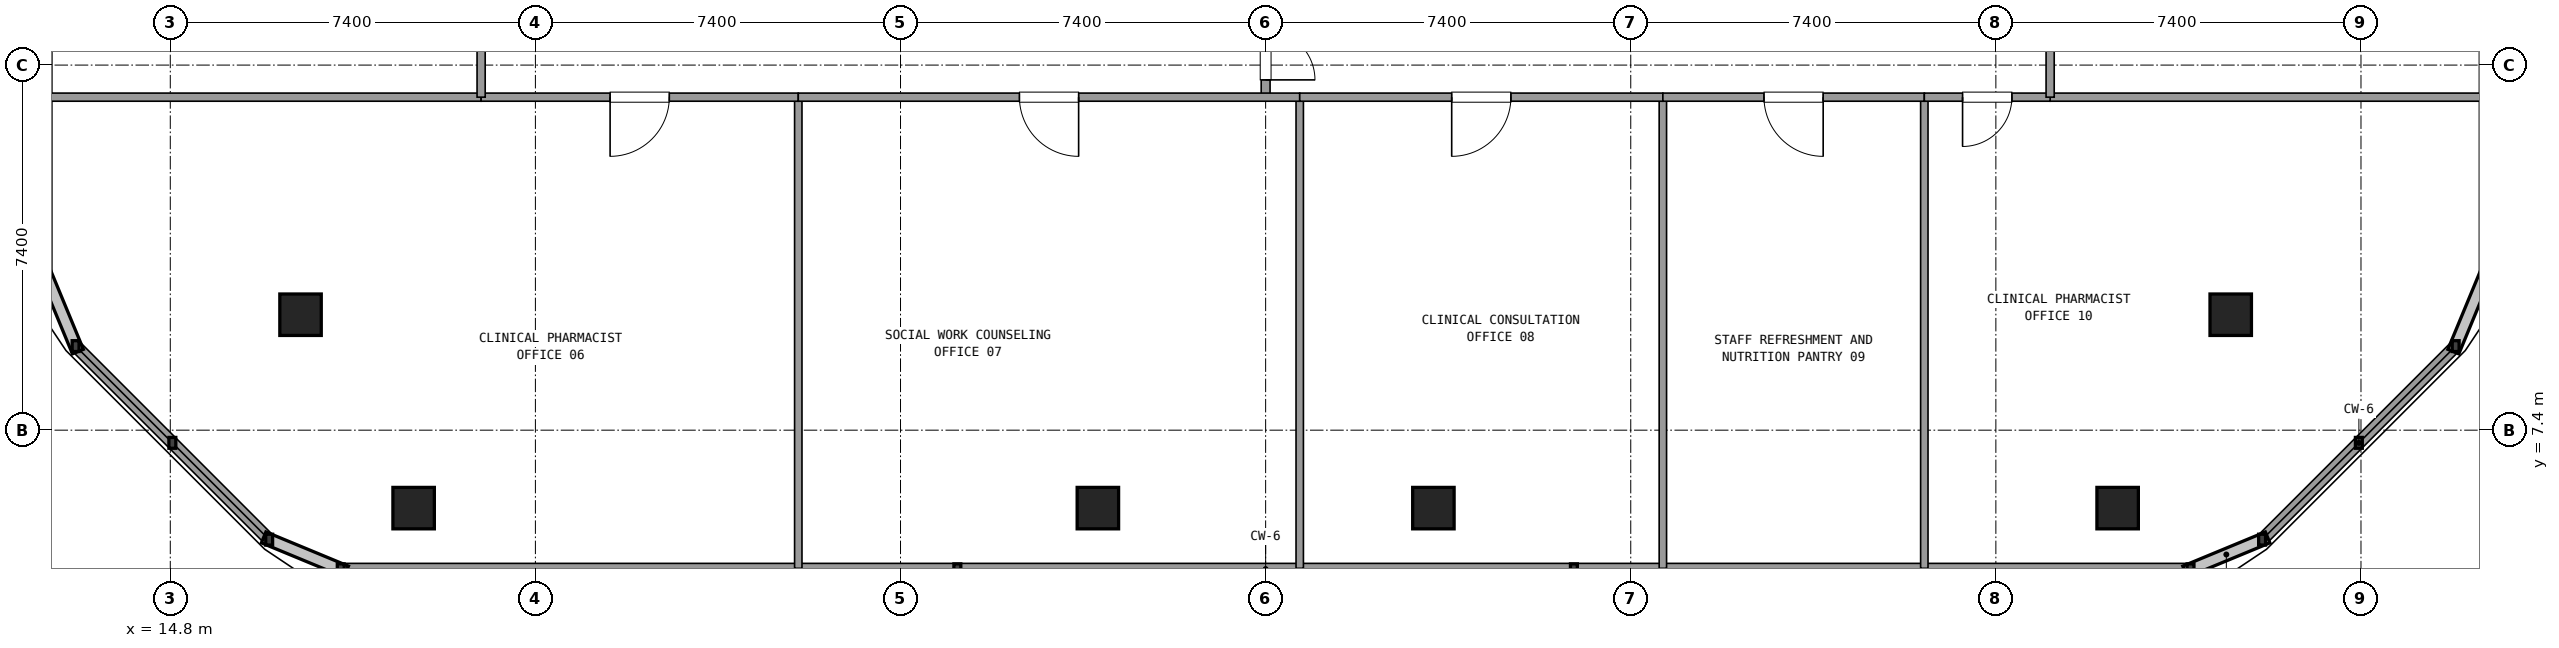
"""IFC4 building model, lengths in metres.
Left out: names, types, materials, properties, quantities, classifications, styles, units other than length and angle.
Written with IfcOpenShell. Run it as: python <this file> out.ifc"""

import sys

from ifc_helpers import new_model, si_unit, direction, frame, frame_2d, origin, origin_2d, place, context, subcontext, project, spatial, rectangle, extrude, element, fill, save


model = new_model("IFC4")
c1 = context("Model", 3, precision=1e-05, world=origin(), true_north=direction((0.0, 1.0)))
c2 = subcontext(c1, "Body", "Model", "MODEL_VIEW")
j1 = project(units=[si_unit("LENGTHUNIT", "METRE"), si_unit("PLANEANGLEUNIT", "RADIAN")], contexts=[c1])
p1 = place(None, origin())
s1 = spatial("IfcSite", under=j1, at=p1, CompositionType="ELEMENT")
p2 = place(p1, origin())
s2 = spatial("IfcBuilding", under=s1, at=p2, CompositionType="ELEMENT")
p3 = place(p2, frame((0.0, 0.0, 242.82)))
s3 = spatial("IfcBuildingStorey", under=s2, at=p3, CompositionType="ELEMENT", Elevation=242.82)
for number, where, z_axis, x_axis in (
    (1, (17.44, 9.74, 0.0), (0.0, 0.0, 1.0), (1.0, 0.0, 0.0)),
    (2, (19.732, 5.82, 0.0), (0.0, 0.0, 1.0), (1.0, 0.0, 0.0)),
    (3, (33.6, 5.82, 0.0), (0.0, 0.0, 1.0), (1.0, 0.0, 0.0)),
    (4, (40.4, 5.82, 0.0), (0.0, 0.0, 1.0), (1.0, 0.0, 0.0)),
    (5, (54.268, 5.82, 0.0), (0.0, 0.0, 1.0), (1.0, 0.0, 0.0)),
    (6, (56.56, 9.74, 0.0), (0.0, 0.0, 1.0), (1.0, 0.0, 0.0)),
):
    element("IfcColumn", number, at=place(p3, frame(where, z_axis=z_axis, x_axis=x_axis)), inside=s3, PredefinedType="COLUMN", context=c2, shape_type="SweptSolid", body=[
        extrude(rectangle(XDim=0.84, YDim=0.84, at=origin_2d()), origin(), (0.0, 0.0, 1.0), 3.6),
    ])
p4 = place(p3, frame((18.255, 4.58, 0.0), z_axis=(0.0, 0.0, 1.0), x_axis=(1.0, 0.0, 0.0)))
e7 = element("IfcWall", 7, at=p4, inside=s3, PredefinedType="SOLIDWALL", context=c2, shape_type="SweptSolid", body=[
    extrude(rectangle(XDim=37.49, YDim=0.24, at=frame_2d((18.745, 0.0))), origin(), (0.0, 0.0, 1.0), 0.85),
])
p5 = place(p3, frame((57.196, 5.181, 0.0), z_axis=(0.0, 0.0, 1.0), x_axis=(0.707084777957, 0.707128783731, 0.0)))
e8 = element("IfcWall", 8, at=p5, inside=s3, PredefinedType="SOLIDWALL", context=c2, shape_type="SweptSolid", body=[
    extrude(rectangle(XDim=5.548, YDim=0.24, at=frame_2d((2.774, 0.0))), origin(), (0.0, 0.0, 1.0), 0.85),
])
for number, where, z_axis, x_axis in (
    (9, (61.72, 10.555, 0.0), (0.0, 0.0, 1.0), (0.0, 1.0, 0.0)),
    (10, (12.28, 24.36, 0.0), (0.0, 0.0, 1.0), (0.0, -1.0, 0.0)),
):
    element("IfcWall", number, at=place(p3, frame(where, z_axis=z_axis, x_axis=x_axis)), inside=s3, PredefinedType="SOLIDWALL", context=c2, shape_type="SweptSolid", body=[
        extrude(rectangle(XDim=13.805, YDim=0.24, at=frame_2d((6.903, 0.0))), origin(), (0.0, 0.0, 1.0), 0.85),
    ])
p6 = place(p3, frame((12.881, 9.104, 0.0), z_axis=(0.0, 0.0, 1.0), x_axis=(0.707084777957, -0.707128783731, 0.0)))
e11 = element("IfcWall", 11, at=p6, inside=s3, PredefinedType="SOLIDWALL", context=c2, shape_type="SweptSolid", body=[
    extrude(rectangle(XDim=5.548, YDim=0.24, at=frame_2d((2.774, 0.0))), origin(), (0.0, 0.0, 1.0), 0.85),
])
p7 = place(p3, frame((37.0, 14.15, 0.0), z_axis=(0.0, 0.0, 1.0), x_axis=(0.0, 1.0, 0.0)))
e12 = element("IfcWall", 12, at=p7, inside=s3, PredefinedType="PARTITIONING", context=c2, shape_type="SweptSolid", body=[
    extrude(rectangle(XDim=2.7, YDim=0.18, at=frame_2d((1.35, 0.0))), origin(), (0.0, 0.0, 1.0), 2.61),
])
p8 = place(p7, frame((0.35, 0.0, 0.0)))
e13 = element("IfcOpeningElement", 13, at=p8, cuts=e12, PredefinedType="OPENING", context=c2, shape_type="SweptSolid", body=[
    extrude(rectangle(XDim=2.0, YDim=2.2, at=frame_2d((1.0, 1.1))), frame((0.0, 0.1, 0.0), z_axis=(0.0, -1.0, 0.0), x_axis=(1.0, 0.0, 0.0)), (0.0, 0.0, 1.0), 0.2),
])
for number, where, z_axis, x_axis in (
    (14, (12.3, 14.15, 0.0), (0.0, 0.0, 1.0), (1.0, 0.0, 0.0)),
    (15, (52.9, 14.15, 0.0), (0.0, 0.0, 1.0), (1.0, 0.0, 0.0)),
):
    element("IfcWall", number, at=place(p3, frame(where, z_axis=z_axis, x_axis=x_axis)), inside=s3, PredefinedType="PARTITIONING", context=c2, shape_type="SweptSolid", body=[
        extrude(rectangle(XDim=8.8, YDim=0.165, at=frame_2d((4.4, 0.0))), origin(), (0.0, 0.0, 1.0), 2.61),
    ])
p9 = place(p3, frame((27.528, 14.15, 0.0), z_axis=(0.0, 0.0, 1.0), x_axis=(0.0, -1.0, 0.0)))
e16 = element("IfcWall", 16, at=p9, inside=s3, PredefinedType="PARTITIONING", context=c2, shape_type="SweptSolid", body=[
    extrude(rectangle(XDim=9.55, YDim=0.15, at=frame_2d((4.775, 0.0))), origin(), (0.0, 0.0, 1.0), 2.61),
])
p10 = place(p3, frame((21.1, 14.15, 0.0), z_axis=(0.0, 0.0, 1.0), x_axis=(1.0, 0.0, 0.0)))
e17 = element("IfcWall", 17, at=p10, inside=s3, PredefinedType="PARTITIONING", context=c2, shape_type="SweptSolid", body=[
    extrude(rectangle(XDim=6.428, YDim=0.165, at=frame_2d((3.214, 0.0))), origin(), (0.0, 0.0, 1.0), 2.61),
])
p11 = place(p10, frame((2.614, 0.0, 0.0)))
e18 = element("IfcOpeningElement", 18, at=p11, cuts=e17, PredefinedType="OPENING", context=c2, shape_type="SweptSolid", body=[
    extrude(rectangle(XDim=1.2, YDim=2.15, at=frame_2d((0.6, 1.075))), frame((0.0, 0.093, 0.0), z_axis=(0.0, -1.0, 0.0), x_axis=(1.0, 0.0, 0.0)), (0.0, 0.0, 1.0), 0.185),
])
p12 = place(p3, frame((37.691, 14.15, 0.0), z_axis=(0.0, 0.0, 1.0), x_axis=(0.0, -1.0, 0.0)))
e19 = element("IfcWall", 19, at=p12, inside=s3, PredefinedType="PARTITIONING", context=c2, shape_type="SweptSolid", body=[
    extrude(rectangle(XDim=9.55, YDim=0.15, at=frame_2d((4.775, 0.0))), origin(), (0.0, 0.0, 1.0), 2.61),
])
p13 = place(p3, frame((27.528, 14.15, 0.0), z_axis=(0.0, 0.0, 1.0), x_axis=(1.0, 0.0, 0.0)))
e20 = element("IfcWall", 20, at=p13, inside=s3, PredefinedType="PARTITIONING", context=c2, shape_type="SweptSolid", body=[
    extrude(rectangle(XDim=10.163, YDim=0.165, at=frame_2d((5.082, 0.0))), origin(), (0.0, 0.0, 1.0), 2.61),
])
p14 = place(p13, frame((4.482, 0.0, 0.0)))
e21 = element("IfcOpeningElement", 21, at=p14, cuts=e20, PredefinedType="OPENING", context=c2, shape_type="SweptSolid", body=[
    extrude(rectangle(XDim=1.2, YDim=2.15, at=frame_2d((0.6, 1.075))), frame((0.0, 0.093, 0.0), z_axis=(0.0, -1.0, 0.0), x_axis=(1.0, 0.0, 0.0)), (0.0, 0.0, 1.0), 0.185),
])
p15 = place(p3, frame((45.051, 14.15, 0.0), z_axis=(0.0, 0.0, 1.0), x_axis=(0.0, -1.0, 0.0)))
e22 = element("IfcWall", 22, at=p15, inside=s3, PredefinedType="PARTITIONING", context=c2, shape_type="SweptSolid", body=[
    extrude(rectangle(XDim=9.55, YDim=0.15, at=frame_2d((4.775, 0.0))), origin(), (0.0, 0.0, 1.0), 2.61),
])
p16 = place(p3, frame((37.691, 14.15, 0.0), z_axis=(0.0, 0.0, 1.0), x_axis=(1.0, 0.0, 0.0)))
e23 = element("IfcWall", 23, at=p16, inside=s3, PredefinedType="PARTITIONING", context=c2, shape_type="SweptSolid", body=[
    extrude(rectangle(XDim=7.36, YDim=0.165, at=frame_2d((3.68, 0.0))), origin(), (0.0, 0.0, 1.0), 2.61),
])
p17 = place(p16, frame((3.08, 0.0, 0.0)))
e24 = element("IfcOpeningElement", 24, at=p17, cuts=e23, PredefinedType="OPENING", context=c2, shape_type="SweptSolid", body=[
    extrude(rectangle(XDim=1.2, YDim=2.15, at=frame_2d((0.6, 1.075))), frame((0.0, 0.093, 0.0), z_axis=(0.0, -1.0, 0.0), x_axis=(1.0, 0.0, 0.0)), (0.0, 0.0, 1.0), 0.185),
])
p18 = place(p3, frame((50.35, 14.15, 0.0), z_axis=(0.0, 0.0, 1.0), x_axis=(0.0, -1.0, 0.0)))
e25 = element("IfcWall", 25, at=p18, inside=s3, PredefinedType="PARTITIONING", context=c2, shape_type="SweptSolid", body=[
    extrude(rectangle(XDim=9.55, YDim=0.15, at=frame_2d((4.775, 0.0))), origin(), (0.0, 0.0, 1.0), 2.61),
])
p19 = place(p3, frame((45.051, 14.15, 0.0), z_axis=(0.0, 0.0, 1.0), x_axis=(1.0, 0.0, 0.0)))
e26 = element("IfcWall", 26, at=p19, inside=s3, PredefinedType="PARTITIONING", context=c2, shape_type="SweptSolid", body=[
    extrude(rectangle(XDim=5.299, YDim=0.165, at=frame_2d((2.649, 0.0))), origin(), (0.0, 0.0, 1.0), 2.61),
])
p20 = place(p19, frame((2.049, 0.0, 0.0)))
e27 = element("IfcOpeningElement", 27, at=p20, cuts=e26, PredefinedType="OPENING", context=c2, shape_type="SweptSolid", body=[
    extrude(rectangle(XDim=1.2, YDim=2.15, at=frame_2d((0.6, 1.075))), frame((0.0, 0.093, 0.0), z_axis=(0.0, -1.0, 0.0), x_axis=(1.0, 0.0, 0.0)), (0.0, 0.0, 1.0), 0.185),
])
p21 = place(p3, frame((50.35, 14.15, 0.0), z_axis=(0.0, 0.0, 1.0), x_axis=(1.0, 0.0, 0.0)))
e28 = element("IfcWall", 28, at=p21, inside=s3, PredefinedType="PARTITIONING", context=c2, shape_type="SweptSolid", body=[
    extrude(rectangle(XDim=2.55, YDim=0.165, at=frame_2d((1.275, 0.0))), origin(), (0.0, 0.0, 1.0), 2.61),
])
p22 = place(p21, frame((0.775, 0.0, 0.0)))
e29 = element("IfcOpeningElement", 29, at=p22, cuts=e28, PredefinedType="OPENING", context=c2, shape_type="SweptSolid", body=[
    extrude(rectangle(XDim=1.0, YDim=2.15, at=frame_2d((0.5, 1.075))), frame((0.0, 0.093, 0.0), z_axis=(0.0, -1.0, 0.0), x_axis=(1.0, 0.0, 0.0)), (0.0, 0.0, 1.0), 0.185),
])
p23 = place(p3, frame((21.1, 14.15, 0.0), z_axis=(0.0, 0.0, 1.0), x_axis=(0.0, 1.0, 0.0)))
e30 = element("IfcWall", 30, at=p23, inside=s3, PredefinedType="PARTITIONING", context=c2, shape_type="SweptSolid", body=[
    extrude(rectangle(XDim=5.17, YDim=0.165, at=frame_2d((2.585, 0.0))), origin(), (0.0, 0.0, 1.0), 2.61),
])
p24 = place(p23, frame((1.985, 0.0, 0.0)))
e31 = element("IfcOpeningElement", 31, at=p24, cuts=e30, PredefinedType="OPENING", context=c2, shape_type="SweptSolid", body=[
    extrude(rectangle(XDim=1.2, YDim=2.15, at=frame_2d((0.6, 1.075))), frame((0.0, 0.093, 0.0), z_axis=(0.0, -1.0, 0.0), x_axis=(1.0, 0.0, 0.0)), (0.0, 0.0, 1.0), 0.185),
])
p25 = place(p3, frame((52.9, 14.15, 0.0), z_axis=(0.0, 0.0, 1.0), x_axis=(0.0, 1.0, 0.0)))
e32 = element("IfcWall", 32, at=p25, inside=s3, PredefinedType="PARTITIONING", context=c2, shape_type="SweptSolid", body=[
    extrude(rectangle(XDim=9.87, YDim=0.165, at=frame_2d((4.935, 0.0))), origin(), (0.0, 0.0, 1.0), 2.61),
])
p26 = place(p25, frame((4.335, 0.0, 0.0)))
e33 = element("IfcOpeningElement", 33, at=p26, cuts=e32, PredefinedType="OPENING", context=c2, shape_type="SweptSolid", body=[
    extrude(rectangle(XDim=1.2, YDim=2.15, at=frame_2d((0.6, 1.075))), frame((0.0, 0.093, 0.0), z_axis=(0.0, -1.0, 0.0), x_axis=(1.0, 0.0, 0.0)), (0.0, 0.0, 1.0), 0.185),
])
p27 = place(p8, frame((2.0, 0.0, 0.0), z_axis=(0.0, 0.0, 1.0), x_axis=(-1.0, 0.0, 0.0)))
e34 = element("IfcDoor", 34, at=p27, inside=s3, OperationType="DOUBLE_DOOR_SINGLE_SWING", PredefinedType="DOOR", context=c2, shape_type="SweptSolid", body=[
    extrude(rectangle(XDim=2.0, YDim=2.2, at=frame_2d((1.0, 1.1))), frame((0.0, 0.025, 0.0), z_axis=(0.0, -1.0, 0.0), x_axis=(1.0, 0.0, 0.0)), (0.0, 0.0, 1.0), 0.05),
])
fill(e13, e34)
p28 = place(p11, frame((1.2, 0.0, 0.0), z_axis=(0.0, 0.0, 1.0), x_axis=(-1.0, 0.0, 0.0)))
e35 = element("IfcDoor", 35, at=p28, inside=s3, OperationType="SINGLE_SWING_LEFT", PredefinedType="DOOR", context=c2, shape_type="SweptSolid", body=[
    extrude(rectangle(XDim=1.2, YDim=2.15, at=frame_2d((0.6, 1.075))), frame((0.0, 0.025, 0.0), z_axis=(0.0, -1.0, 0.0), x_axis=(1.0, 0.0, 0.0)), (0.0, 0.0, 1.0), 0.05),
])
fill(e18, e35)
p29 = place(p14, frame((1.2, 0.0, 0.0), z_axis=(0.0, 0.0, 1.0), x_axis=(-1.0, 0.0, 0.0)))
e36 = element("IfcDoor", 36, at=p29, inside=s3, OperationType="SINGLE_SWING_RIGHT", PredefinedType="DOOR", context=c2, shape_type="SweptSolid", body=[
    extrude(rectangle(XDim=1.2, YDim=2.15, at=frame_2d((0.6, 1.075))), frame((0.0, 0.025, 0.0), z_axis=(0.0, -1.0, 0.0), x_axis=(1.0, 0.0, 0.0)), (0.0, 0.0, 1.0), 0.05),
])
fill(e21, e36)
p30 = place(p17, frame((1.2, 0.0, 0.0), z_axis=(0.0, 0.0, 1.0), x_axis=(-1.0, 0.0, 0.0)))
e37 = element("IfcDoor", 37, at=p30, inside=s3, OperationType="SINGLE_SWING_LEFT", PredefinedType="DOOR", context=c2, shape_type="SweptSolid", body=[
    extrude(rectangle(XDim=1.2, YDim=2.15, at=frame_2d((0.6, 1.075))), frame((0.0, 0.025, 0.0), z_axis=(0.0, -1.0, 0.0), x_axis=(1.0, 0.0, 0.0)), (0.0, 0.0, 1.0), 0.05),
])
fill(e24, e37)
p31 = place(p20, frame((1.2, 0.0, 0.0), z_axis=(0.0, 0.0, 1.0), x_axis=(-1.0, 0.0, 0.0)))
e38 = element("IfcDoor", 38, at=p31, inside=s3, OperationType="SINGLE_SWING_RIGHT", PredefinedType="DOOR", context=c2, shape_type="SweptSolid", body=[
    extrude(rectangle(XDim=1.2, YDim=2.15, at=frame_2d((0.6, 1.075))), frame((0.0, 0.025, 0.0), z_axis=(0.0, -1.0, 0.0), x_axis=(1.0, 0.0, 0.0)), (0.0, 0.0, 1.0), 0.05),
])
fill(e27, e38)
p32 = place(p22, frame((1.0, 0.0, 0.0), z_axis=(0.0, 0.0, 1.0), x_axis=(-1.0, 0.0, 0.0)))
e39 = element("IfcDoor", 39, at=p32, inside=s3, OperationType="SINGLE_SWING_LEFT", PredefinedType="DOOR", context=c2, shape_type="SweptSolid", body=[
    extrude(rectangle(XDim=1.0, YDim=2.15, at=frame_2d((0.5, 1.075))), frame((0.0, 0.025, 0.0), z_axis=(0.0, -1.0, 0.0), x_axis=(1.0, 0.0, 0.0)), (0.0, 0.0, 1.0), 0.05),
])
fill(e29, e39)
save(model, sys.argv[1])
